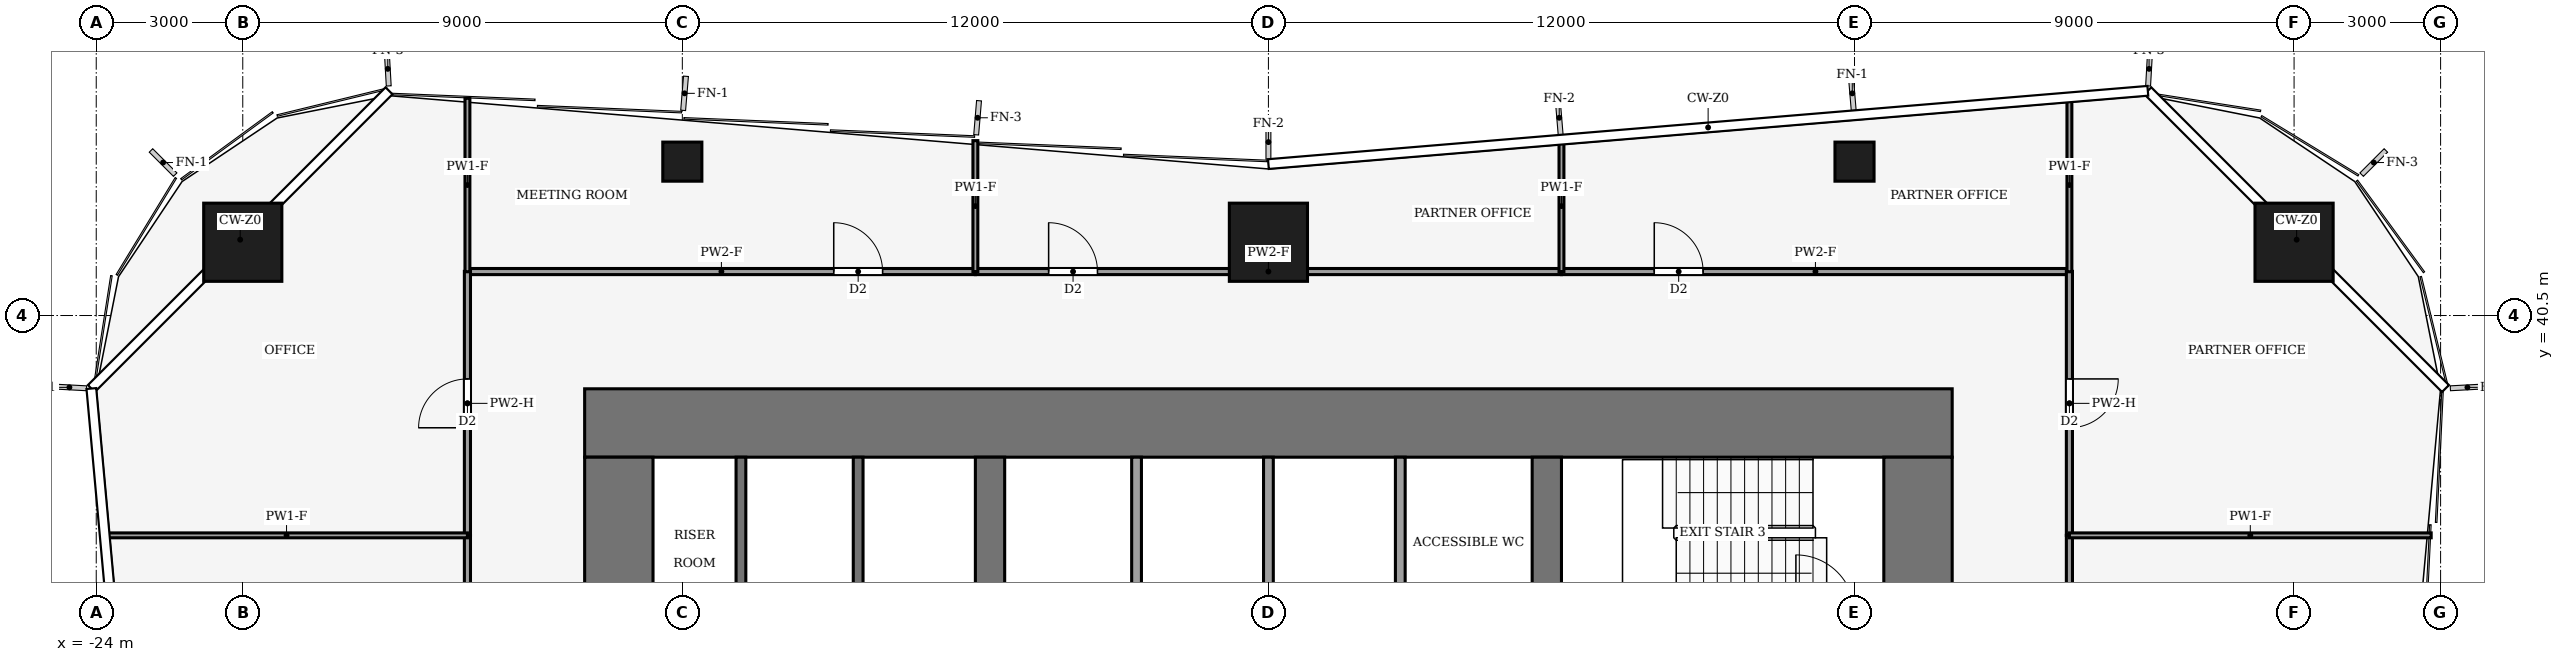
"""IFC4 building model, lengths in metres.
Left out: names, types, materials, properties, quantities, classifications, styles, units other than length and angle.
Written with IfcOpenShell. Run it as: python <this file> out.ifc"""

import sys

from ifc_helpers import new_model, si_unit, direction, frame, frame_2d, origin, origin_2d, place, context, subcontext, project, spatial, rectangle, hollow_rectangle, extrude, element, fill, save


model = new_model("IFC4")
c1 = context("Model", 3, precision=1e-05, world=origin(), true_north=direction((0.0, 1.0)))
c2 = subcontext(c1, "Body", "Model", "MODEL_VIEW")
j1 = project(units=[si_unit("LENGTHUNIT", "METRE"), si_unit("PLANEANGLEUNIT", "RADIAN")], contexts=[c1])
p1 = place(None, origin())
s1 = spatial("IfcSite", under=j1, at=p1, CompositionType="ELEMENT")
p2 = place(p1, origin())
s2 = spatial("IfcBuilding", under=s1, at=p2, CompositionType="ELEMENT")
p3 = place(p2, frame((0.0, 0.0, 50.0)))
s3 = spatial("IfcBuildingStorey", under=s2, at=p3, CompositionType="ELEMENT", Elevation=50.0)
p4 = place(p3, frame((-14.0, 38.3, -0.13), z_axis=(0.0, 0.0, 1.0), x_axis=(1.0, 0.0, 0.0)))
e1 = element("IfcWall", 1, at=p4, inside=s3, PredefinedType="SHEAR", context=c2, shape_type="SweptSolid", body=[
    extrude(rectangle(XDim=28.0, YDim=1.4, at=frame_2d((14.0, 0.0))), origin(), (0.0, 0.0, 1.0), 4.0),
])
p5 = place(p3, frame((-13.3, 18.4, -0.13), z_axis=(0.0, 0.0, 1.0), x_axis=(0.0, 1.0, 0.0)))
e2 = element("IfcWall", 2, at=p5, inside=s3, PredefinedType="SHEAR", context=c2, shape_type="SweptSolid", body=[
    extrude(rectangle(XDim=19.2, YDim=1.4, at=frame_2d((9.6, 0.0))), origin(), (0.0, 0.0, 1.0), 4.0),
])
p6 = place(p5, frame((2.8, 0.0, 0.13)))
e3 = element("IfcOpeningElement", 3, at=p6, cuts=e2, PredefinedType="OPENING", context=c2, shape_type="SweptSolid", body=[
    extrude(rectangle(XDim=2.4, YDim=2.4, at=frame_2d((1.2, 1.2))), frame((0.0, 0.71, 0.0), z_axis=(0.0, -1.0, 0.0), x_axis=(1.0, 0.0, 0.0)), (0.0, 0.0, 1.0), 1.42),
])
p7 = place(p5, frame((13.4, 0.0, 0.13)))
e4 = element("IfcOpeningElement", 4, at=p7, cuts=e2, PredefinedType="OPENING", context=c2, shape_type="SweptSolid", body=[
    extrude(rectangle(XDim=1.4, YDim=2.2, at=frame_2d((0.7, 1.1))), frame((0.0, 0.71, 0.0), z_axis=(0.0, -1.0, 0.0), x_axis=(1.0, 0.0, 0.0)), (0.0, 0.0, 1.0), 1.42),
])
p8 = place(p3, frame((13.3, 18.4, -0.13), z_axis=(0.0, 0.0, 1.0), x_axis=(0.0, 1.0, 0.0)))
e5 = element("IfcWall", 5, at=p8, inside=s3, PredefinedType="SHEAR", context=c2, shape_type="SweptSolid", body=[
    extrude(rectangle(XDim=19.2, YDim=1.4, at=frame_2d((9.6, 0.0))), origin(), (0.0, 0.0, 1.0), 4.0),
])
p9 = place(p8, frame((2.8, 0.0, 0.13)))
e6 = element("IfcOpeningElement", 6, at=p9, cuts=e5, PredefinedType="OPENING", context=c2, shape_type="SweptSolid", body=[
    extrude(rectangle(XDim=2.4, YDim=2.4, at=frame_2d((1.2, 1.2))), frame((0.0, 0.71, 0.0), z_axis=(0.0, -1.0, 0.0), x_axis=(1.0, 0.0, 0.0)), (0.0, 0.0, 1.0), 1.42),
])
p10 = place(p8, frame((13.3, 0.0, 0.13)))
e7 = element("IfcOpeningElement", 7, at=p10, cuts=e5, PredefinedType="OPENING", context=c2, shape_type="SweptSolid", body=[
    extrude(rectangle(XDim=2.4, YDim=2.4, at=frame_2d((1.2, 1.2))), frame((0.0, 0.71, 0.0), z_axis=(0.0, -1.0, 0.0), x_axis=(1.0, 0.0, 0.0)), (0.0, 0.0, 1.0), 1.42),
])
p11 = place(p3, frame((-5.7, 18.4, -0.13), z_axis=(0.0, 0.0, 1.0), x_axis=(0.0, 1.0, 0.0)))
e8 = element("IfcWall", 8, at=p11, inside=s3, PredefinedType="SHEAR", context=c2, shape_type="SweptSolid", body=[
    extrude(rectangle(XDim=19.2, YDim=0.6, at=frame_2d((9.6, 0.0))), origin(), (0.0, 0.0, 1.0), 4.0),
])
p12 = place(p11, frame((8.35, 0.0, 0.13)))
e9 = element("IfcOpeningElement", 9, at=p12, cuts=e8, PredefinedType="OPENING", context=c2, shape_type="SweptSolid", body=[
    extrude(rectangle(XDim=0.9, YDim=2.1, at=frame_2d((0.45, 1.05))), frame((0.0, 0.31, 0.0), z_axis=(0.0, -1.0, 0.0), x_axis=(1.0, 0.0, 0.0)), (0.0, 0.0, 1.0), 0.62),
])
p13 = place(p3, frame((5.7, 18.4, -0.13), z_axis=(0.0, 0.0, 1.0), x_axis=(0.0, 1.0, 0.0)))
e10 = element("IfcWall", 10, at=p13, inside=s3, PredefinedType="SHEAR", context=c2, shape_type="SweptSolid", body=[
    extrude(rectangle(XDim=19.2, YDim=0.6, at=frame_2d((9.6, 0.0))), origin(), (0.0, 0.0, 1.0), 4.0),
])
p14 = place(p13, frame((8.35, 0.0, 0.13)))
e11 = element("IfcOpeningElement", 11, at=p14, cuts=e10, PredefinedType="OPENING", context=c2, shape_type="SweptSolid", body=[
    extrude(rectangle(XDim=0.9, YDim=2.1, at=frame_2d((0.45, 1.05))), frame((0.0, 0.31, 0.0), z_axis=(0.0, -1.0, 0.0), x_axis=(1.0, 0.0, 0.0)), (0.0, 0.0, 1.0), 0.62),
])
p15 = place(p13, frame((13.3, 0.0, 0.13)))
e12 = element("IfcOpeningElement", 12, at=p15, cuts=e10, PredefinedType="OPENING", context=c2, shape_type="SweptSolid", body=[
    extrude(rectangle(XDim=2.4, YDim=2.4, at=frame_2d((1.2, 1.2))), frame((0.0, 0.31, 0.0), z_axis=(0.0, -1.0, 0.0), x_axis=(1.0, 0.0, 0.0)), (0.0, 0.0, 1.0), 0.62),
])
for number, where, z_axis, x_axis in (
    (13, (-21.0, 42.0, 0.0), (0.0, 0.0, 1.0), (1.0, 0.0, 0.0)),
    (14, (0.0, 42.0, 0.0), (0.0, 0.0, 1.0), (1.0, 0.0, 0.0)),
    (15, (21.0, 42.0, 0.0), (0.0, 0.0, 1.0), (1.0, 0.0, 0.0)),
):
    element("IfcColumn", number, at=place(p3, frame(where, z_axis=z_axis, x_axis=x_axis)), inside=s3, PredefinedType="COLUMN", context=c2, shape_type="SweptSolid", body=[
        extrude(hollow_rectangle(XDim=1.6, YDim=1.6, WallThickness=0.09, at=origin_2d()), origin(), (0.0, 0.0, 1.0), 4.0),
    ])
for number, where, z_axis, x_axis in (
    (16, (-12.0, 43.65, 0.0), (0.0, 0.0, 1.0), (1.0, 0.0, 0.0)),
    (17, (12.0, 43.65, 0.0), (0.0, 0.0, 1.0), (1.0, 0.0, 0.0)),
):
    element("IfcColumn", number, at=place(p3, frame(where, z_axis=z_axis, x_axis=x_axis)), inside=s3, PredefinedType="COLUMN", context=c2, shape_type="SweptSolid", body=[
        extrude(hollow_rectangle(XDim=0.8, YDim=0.8, WallThickness=0.04, at=origin_2d()), origin(), (0.0, 0.0, 1.0), 4.0),
    ])
for number, where, z_axis, x_axis in (
    (18, (-10.8, 34.0, 0.0), (0.0, 0.0, 1.0), (0.0, 1.0, 0.0)),
    (19, (-8.4, 34.0, 0.0), (0.0, 0.0, 1.0), (0.0, 1.0, 0.0)),
    (20, (-2.7, 34.0, 0.0), (0.0, 0.0, 1.0), (0.0, 1.0, 0.0)),
    (21, (0.0, 34.0, 0.0), (0.0, 0.0, 1.0), (0.0, 1.0, 0.0)),
    (22, (2.7, 34.0, 0.0), (0.0, 0.0, 1.0), (0.0, 1.0, 0.0)),
):
    element("IfcWall", number, at=place(p3, frame(where, z_axis=z_axis, x_axis=x_axis)), inside=s3, PredefinedType="PARTITIONING", context=c2, shape_type="SweptSolid", body=[
        extrude(rectangle(XDim=3.6, YDim=0.2, at=frame_2d((1.8, 0.0))), origin(), (0.0, 0.0, 1.0), 3.87),
    ])
p16 = place(p3, frame((-16.4, 41.4, 0.0), z_axis=(0.0, 0.0, 1.0), x_axis=(1.0, 0.0, 0.0)))
e23 = element("IfcWall", 23, at=p16, inside=s3, PredefinedType="PARTITIONING", context=c2, shape_type="SweptSolid", body=[
    extrude(rectangle(XDim=10.4, YDim=0.125, at=frame_2d((5.2, 0.0))), origin(), (0.0, 0.0, 1.0), 3.54),
])
p17 = place(p16, frame((7.5, 0.0, 0.0)))
e24 = element("IfcOpeningElement", 24, at=p17, cuts=e23, PredefinedType="OPENING", context=c2, shape_type="SweptSolid", body=[
    extrude(rectangle(XDim=1.0, YDim=2.1, at=frame_2d((0.5, 1.05))), frame((0.0, 0.073, 0.0), z_axis=(0.0, -1.0, 0.0), x_axis=(1.0, 0.0, 0.0)), (0.0, 0.0, 1.0), 0.145),
])
p18 = place(p3, frame((-6.0, 41.4, 0.0), z_axis=(0.0, 0.0, 1.0), x_axis=(1.0, 0.0, 0.0)))
e25 = element("IfcWall", 25, at=p18, inside=s3, PredefinedType="PARTITIONING", context=c2, shape_type="SweptSolid", body=[
    extrude(rectangle(XDim=12.0, YDim=0.125, at=frame_2d((6.0, 0.0))), origin(), (0.0, 0.0, 1.0), 3.54),
])
p19 = place(p18, frame((1.5, 0.0, 0.0)))
e26 = element("IfcOpeningElement", 26, at=p19, cuts=e25, PredefinedType="OPENING", context=c2, shape_type="SweptSolid", body=[
    extrude(rectangle(XDim=1.0, YDim=2.1, at=frame_2d((0.5, 1.05))), frame((0.0, 0.073, 0.0), z_axis=(0.0, -1.0, 0.0), x_axis=(1.0, 0.0, 0.0)), (0.0, 0.0, 1.0), 0.145),
])
p20 = place(p3, frame((6.0, 41.4, 0.0), z_axis=(0.0, 0.0, 1.0), x_axis=(1.0, 0.0, 0.0)))
e27 = element("IfcWall", 27, at=p20, inside=s3, PredefinedType="PARTITIONING", context=c2, shape_type="SweptSolid", body=[
    extrude(rectangle(XDim=10.4, YDim=0.125, at=frame_2d((5.2, 0.0))), origin(), (0.0, 0.0, 1.0), 3.54),
])
p21 = place(p20, frame((1.9, 0.0, 0.0)))
e28 = element("IfcOpeningElement", 28, at=p21, cuts=e27, PredefinedType="OPENING", context=c2, shape_type="SweptSolid", body=[
    extrude(rectangle(XDim=1.0, YDim=2.1, at=frame_2d((0.5, 1.05))), frame((0.0, 0.073, 0.0), z_axis=(0.0, -1.0, 0.0), x_axis=(1.0, 0.0, 0.0)), (0.0, 0.0, 1.0), 0.145),
])
p22 = place(p3, frame((-16.4, 27.0, 0.0), z_axis=(0.0, 0.0, 1.0), x_axis=(0.0, 1.0, 0.0)))
e29 = element("IfcWall", 29, at=p22, inside=s3, PredefinedType="PARTITIONING", context=c2, shape_type="SweptSolid", body=[
    extrude(rectangle(XDim=9.0, YDim=0.125, at=frame_2d((4.5, 0.0))), origin(), (0.0, 0.0, 1.0), 3.48),
])
p23 = place(p22, frame((4.0, 0.0, 0.0)))
e30 = element("IfcOpeningElement", 30, at=p23, cuts=e29, PredefinedType="OPENING", context=c2, shape_type="SweptSolid", body=[
    extrude(rectangle(XDim=1.0, YDim=2.1, at=frame_2d((0.5, 1.05))), frame((0.0, 0.073, 0.0), z_axis=(0.0, -1.0, 0.0), x_axis=(1.0, 0.0, 0.0)), (0.0, 0.0, 1.0), 0.145),
])
p24 = place(p3, frame((-16.4, 36.0, 0.0), z_axis=(0.0, 0.0, 1.0), x_axis=(0.0, 1.0, 0.0)))
e31 = element("IfcWall", 31, at=p24, inside=s3, PredefinedType="PARTITIONING", context=c2, shape_type="SweptSolid", body=[
    extrude(rectangle(XDim=5.404, YDim=0.125, at=frame_2d((2.702, 0.0))), origin(), (0.0, 0.0, 1.0), 3.14),
])
p25 = place(p24, frame((2.202, 0.0, 0.0)))
e32 = element("IfcOpeningElement", 32, at=p25, cuts=e31, PredefinedType="OPENING", context=c2, shape_type="SweptSolid", body=[
    extrude(rectangle(XDim=1.0, YDim=2.1, at=frame_2d((0.5, 1.05))), frame((0.0, 0.073, 0.0), z_axis=(0.0, -1.0, 0.0), x_axis=(1.0, 0.0, 0.0)), (0.0, 0.0, 1.0), 0.145),
])
p26 = place(p3, frame((16.4, 36.0, 0.0), z_axis=(0.0, 0.0, 1.0), x_axis=(0.0, -1.0, 0.0)))
e33 = element("IfcWall", 33, at=p26, inside=s3, PredefinedType="PARTITIONING", context=c2, shape_type="SweptSolid", body=[
    extrude(rectangle(XDim=9.0, YDim=0.125, at=frame_2d((4.5, 0.0))), origin(), (0.0, 0.0, 1.0), 3.48),
])
p27 = place(p26, frame((4.0, 0.0, 0.0)))
e34 = element("IfcOpeningElement", 34, at=p27, cuts=e33, PredefinedType="OPENING", context=c2, shape_type="SweptSolid", body=[
    extrude(rectangle(XDim=1.0, YDim=2.1, at=frame_2d((0.5, 1.05))), frame((0.0, 0.073, 0.0), z_axis=(0.0, -1.0, 0.0), x_axis=(1.0, 0.0, 0.0)), (0.0, 0.0, 1.0), 0.145),
])
p28 = place(p3, frame((16.4, 41.404, 0.0), z_axis=(0.0, 0.0, 1.0), x_axis=(0.0, -1.0, 0.0)))
e35 = element("IfcWall", 35, at=p28, inside=s3, PredefinedType="PARTITIONING", context=c2, shape_type="SweptSolid", body=[
    extrude(rectangle(XDim=5.404, YDim=0.125, at=frame_2d((2.702, 0.0))), origin(), (0.0, 0.0, 1.0), 3.14),
])
p29 = place(p28, frame((2.202, 0.0, 0.0)))
e36 = element("IfcOpeningElement", 36, at=p29, cuts=e35, PredefinedType="OPENING", context=c2, shape_type="SweptSolid", body=[
    extrude(rectangle(XDim=1.0, YDim=2.1, at=frame_2d((0.5, 1.05))), frame((0.0, 0.073, 0.0), z_axis=(0.0, -1.0, 0.0), x_axis=(1.0, 0.0, 0.0)), (0.0, 0.0, 1.0), 0.145),
])
p30 = place(p3, frame((-6.0, 41.4, 0.0), z_axis=(0.0, 0.0, 1.0), x_axis=(0.0, 1.0, 0.0)))
e37 = element("IfcWall", 37, at=p30, inside=s3, PredefinedType="PARTITIONING", context=c2, shape_type="SweptSolid", body=[
    extrude(rectangle(XDim=2.68, YDim=0.1, at=frame_2d((1.34, 0.0))), origin(), (0.0, 0.0, 1.0), 3.04),
])
p31 = place(p3, frame((-16.4, 44.947, 0.0), z_axis=(0.0, 0.0, 1.0), x_axis=(0.0, -1.0, 0.0)))
e38 = element("IfcWall", 38, at=p31, inside=s3, PredefinedType="PARTITIONING", context=c2, shape_type="SweptSolid", body=[
    extrude(rectangle(XDim=3.551, YDim=0.1, at=frame_2d((1.775, 0.0))), origin(), (0.0, 0.0, 1.0), 3.04),
])
p32 = place(p3, frame((6.0, 41.4, 0.0), z_axis=(0.0, 0.0, 1.0), x_axis=(0.0, 1.0, 0.0)))
e39 = element("IfcWall", 39, at=p32, inside=s3, PredefinedType="PARTITIONING", context=c2, shape_type="SweptSolid", body=[
    extrude(rectangle(XDim=2.68, YDim=0.1, at=frame_2d((1.34, 0.0))), origin(), (0.0, 0.0, 1.0), 3.04),
])
p33 = place(p3, frame((16.4, 41.396, 0.0), z_axis=(0.0, 0.0, 1.0), x_axis=(0.0, 1.0, 0.0)))
e40 = element("IfcWall", 40, at=p33, inside=s3, PredefinedType="PARTITIONING", context=c2, shape_type="SweptSolid", body=[
    extrude(rectangle(XDim=3.551, YDim=0.1, at=frame_2d((1.775, 0.0))), origin(), (0.0, 0.0, 1.0), 3.04),
])
for number, where, z_axis, x_axis in (
    (41, (-16.4, 36.0, 0.0), (0.0, 0.0, 1.0), (-1.0, 0.0, 0.0)),
    (42, (23.807, 36.0, 0.0), (0.0, 0.0, 1.0), (-1.0, 0.0, 0.0)),
):
    element("IfcWall", number, at=place(p3, frame(where, z_axis=z_axis, x_axis=x_axis)), inside=s3, PredefinedType="PARTITIONING", context=c2, shape_type="SweptSolid", body=[
        extrude(rectangle(XDim=7.407, YDim=0.1, at=frame_2d((3.704, 0.0))), origin(), (0.0, 0.0, 1.0), 3.04),
    ])
p34 = place(p17, origin())
e43 = element("IfcDoor", 43, at=p34, inside=s3, OperationType="SINGLE_SWING_RIGHT", PredefinedType="DOOR", context=c2, shape_type="SweptSolid", body=[
    extrude(rectangle(XDim=1.0, YDim=2.1, at=frame_2d((0.5, 1.05))), frame((0.0, 0.025, 0.0), z_axis=(0.0, -1.0, 0.0), x_axis=(1.0, 0.0, 0.0)), (0.0, 0.0, 1.0), 0.05),
])
fill(e24, e43)
p35 = place(p19, origin())
e44 = element("IfcDoor", 44, at=p35, inside=s3, OperationType="SINGLE_SWING_LEFT", PredefinedType="DOOR", context=c2, shape_type="SweptSolid", body=[
    extrude(rectangle(XDim=1.0, YDim=2.1, at=frame_2d((0.5, 1.05))), frame((0.0, 0.025, 0.0), z_axis=(0.0, -1.0, 0.0), x_axis=(1.0, 0.0, 0.0)), (0.0, 0.0, 1.0), 0.05),
])
fill(e26, e44)
p36 = place(p21, origin())
e45 = element("IfcDoor", 45, at=p36, inside=s3, OperationType="SINGLE_SWING_LEFT", PredefinedType="DOOR", context=c2, shape_type="SweptSolid", body=[
    extrude(rectangle(XDim=1.0, YDim=2.1, at=frame_2d((0.5, 1.05))), frame((0.0, 0.025, 0.0), z_axis=(0.0, -1.0, 0.0), x_axis=(1.0, 0.0, 0.0)), (0.0, 0.0, 1.0), 0.05),
])
fill(e28, e45)
p37 = place(p25, origin())
e46 = element("IfcDoor", 46, at=p37, inside=s3, OperationType="SINGLE_SWING_RIGHT", PredefinedType="DOOR", context=c2, shape_type="SweptSolid", body=[
    extrude(rectangle(XDim=1.0, YDim=2.1, at=frame_2d((0.5, 1.05))), frame((0.0, 0.025, 0.0), z_axis=(0.0, -1.0, 0.0), x_axis=(1.0, 0.0, 0.0)), (0.0, 0.0, 1.0), 0.05),
])
fill(e32, e46)
p38 = place(p29, origin())
e47 = element("IfcDoor", 47, at=p38, inside=s3, OperationType="SINGLE_SWING_RIGHT", PredefinedType="DOOR", context=c2, shape_type="SweptSolid", body=[
    extrude(rectangle(XDim=1.0, YDim=2.1, at=frame_2d((0.5, 1.05))), frame((0.0, 0.025, 0.0), z_axis=(0.0, -1.0, 0.0), x_axis=(1.0, 0.0, 0.0)), (0.0, 0.0, 1.0), 0.05),
])
fill(e36, e47)
save(model, sys.argv[1])
